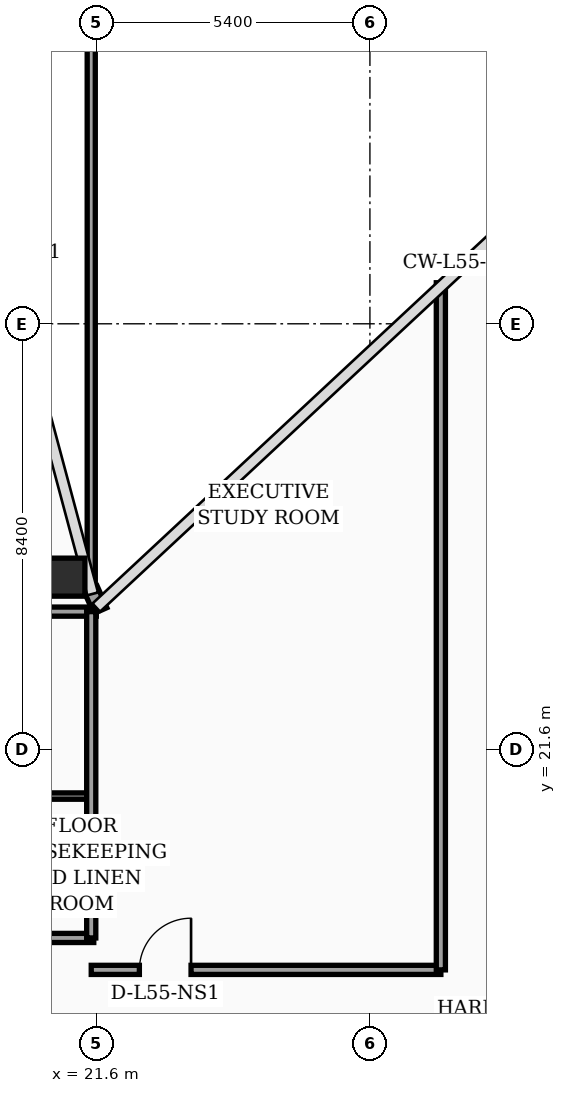
"""IFC4 building model, lengths in metres.
Left out: names, types, materials, properties, quantities, classifications, styles, units other than length and angle.
Written with IfcOpenShell. Run it as: python <this file> out.ifc"""

import sys

from ifc_helpers import new_model, si_unit, direction, frame, frame_2d, origin, origin_2d, place, context, subcontext, project, spatial, rectangle, hollow_rectangle, extrude, element, fill, save


model = new_model("IFC4")
c1 = context("Model", 3, precision=1e-05, world=origin(), true_north=direction((0.0, 1.0)))
c2 = subcontext(c1, "Body", "Model", "MODEL_VIEW")
j1 = project(units=[si_unit("LENGTHUNIT", "METRE"), si_unit("PLANEANGLEUNIT", "RADIAN")], contexts=[c1])
p1 = place(None, origin())
s1 = spatial("IfcSite", under=j1, at=p1, CompositionType="ELEMENT")
p2 = place(p1, origin())
s2 = spatial("IfcBuilding", under=s1, at=p2, CompositionType="ELEMENT")
p3 = place(p2, frame((0.0, 0.0, 223.1)))
s3 = spatial("IfcBuildingStorey", under=s2, at=p3, CompositionType="ELEMENT", Elevation=223.1)
p4 = place(p3, frame((21.0, 25.0, 0.0), z_axis=(0.0, 0.0, 1.0), x_axis=(1.0, 0.0, 0.0)))
e1 = element("IfcColumn", 1, at=p4, inside=s3, PredefinedType="COLUMN", context=c2, shape_type="SweptSolid", body=[
    extrude(hollow_rectangle(XDim=0.75, YDim=0.75, WallThickness=0.032, at=origin_2d()), origin(), (0.0, 0.0, 1.0), 3.56),
])
p5 = place(p3, frame((21.68, 24.34, 0.0), z_axis=(0.0, 0.0, 1.0), x_axis=(-0.40758134973, 0.913168901875, 0.0)))
e2 = element("IfcWall", 2, at=p5, inside=s3, PredefinedType="SOLIDWALL", context=c2, shape_type="SweptSolid", body=[
    extrude(rectangle(XDim=0.471, YDim=0.28, at=frame_2d((0.235, 0.0))), origin(), (0.0, 0.0, 1.0), 3.56),
])
p6 = place(p3, frame((17.25, 17.88, 0.0), z_axis=(0.0, 0.0, 1.0), x_axis=(1.0, 0.0, 0.0)))
e3 = element("IfcWall", 3, at=p6, inside=s3, PredefinedType="PARTITIONING", context=c2, shape_type="SweptSolid", body=[
    extrude(rectangle(XDim=4.3, YDim=0.18, at=frame_2d((2.15, 0.0))), origin(), (0.0, 0.0, 1.0), 3.09),
])
p7 = place(p3, frame((17.25, 20.68, 0.0), z_axis=(0.0, 0.0, 1.0), x_axis=(1.0, 0.0, 0.0)))
e4 = element("IfcWall", 4, at=p7, inside=s3, PredefinedType="PARTITIONING", context=c2, shape_type="SweptSolid", body=[
    extrude(rectangle(XDim=4.3, YDim=0.125, at=frame_2d((2.15, 0.0))), origin(), (0.0, 0.0, 1.0), 3.56),
])
p8 = place(p3, frame((17.25, 24.32, 0.0), z_axis=(0.0, 0.0, 1.0), x_axis=(1.0, 0.0, 0.0)))
e5 = element("IfcWall", 5, at=p8, inside=s3, PredefinedType="PARTITIONING", context=c2, shape_type="SweptSolid", body=[
    extrude(rectangle(XDim=4.35, YDim=0.18, at=frame_2d((2.175, 0.0))), origin(), (0.0, 0.0, 1.0), 3.56),
])
p9 = place(p3, frame((21.5, 17.88, 0.0), z_axis=(0.0, 0.0, 1.0), x_axis=(0.0, 1.0, 0.0)))
e6 = element("IfcWall", 6, at=p9, inside=s3, PredefinedType="PARTITIONING", context=c2, shape_type="SweptSolid", body=[
    extrude(rectangle(XDim=6.44, YDim=0.18, at=frame_2d((3.22, 0.0))), origin(), (0.0, 0.0, 1.0), 3.09),
])
p10 = place(p3, frame((21.5, 24.85, 0.0), z_axis=(0.0, 0.0, 1.0), x_axis=(0.0, 1.0, 0.0)))
e7 = element("IfcWall", 7, at=p10, inside=s3, PredefinedType="PARTITIONING", context=c2, shape_type="SweptSolid", body=[
    extrude(rectangle(XDim=13.05, YDim=0.16, at=frame_2d((6.525, 0.0))), origin(), (0.0, 0.0, 1.0), 2.94),
])
p11 = place(p3, frame((21.5, 17.25, 0.0), z_axis=(0.0, 0.0, 1.0), x_axis=(1.0, 0.0, 0.0)))
e8 = element("IfcWall", 8, at=p11, inside=s3, PredefinedType="PARTITIONING", context=c2, shape_type="SweptSolid", body=[
    extrude(rectangle(XDim=6.9, YDim=0.18, at=frame_2d((3.45, 0.0))), origin(), (0.0, 0.0, 1.0), 2.94),
])
p12 = place(p11, frame((0.95, 0.0, 0.0)))
e9 = element("IfcOpeningElement", 9, at=p12, cuts=e8, PredefinedType="OPENING", context=c2, shape_type="SweptSolid", body=[
    extrude(rectangle(XDim=1.02, YDim=2.2, at=frame_2d((0.51, 1.1))), frame((0.0, 0.1, 0.0), z_axis=(0.0, -1.0, 0.0), x_axis=(1.0, 0.0, 0.0)), (0.0, 0.0, 1.0), 0.2),
])
p13 = place(p3, frame((28.4, 17.25, 0.0), z_axis=(0.0, 0.0, 1.0), x_axis=(0.0, 1.0, 0.0)))
e10 = element("IfcWall", 10, at=p13, inside=s3, PredefinedType="PARTITIONING", context=c2, shape_type="SweptSolid", body=[
    extrude(rectangle(XDim=13.56, YDim=0.18, at=frame_2d((6.78, 0.0))), origin(), (0.0, 0.0, 1.0), 2.94),
])
p14 = place(p12, origin())
e11 = element("IfcDoor", 11, at=p14, inside=s3, OperationType="SINGLE_SWING_RIGHT", PredefinedType="DOOR", context=c2, shape_type="SweptSolid", body=[
    extrude(rectangle(XDim=1.02, YDim=2.2, at=frame_2d((0.51, 1.1))), frame((0.0, 0.025, 0.0), z_axis=(0.0, -1.0, 0.0), x_axis=(1.0, 0.0, 0.0)), (0.0, 0.0, 1.0), 0.05),
])
fill(e9, e11)
save(model, sys.argv[1])
